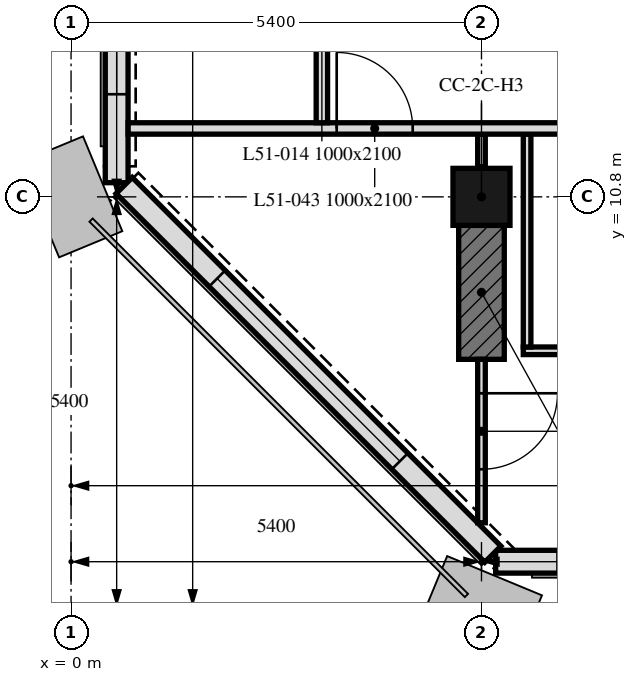
"""IFC4 building model, lengths in metres.
Left out: names, types, materials, properties, quantities, classifications, styles, units other than length and angle.
Written with IfcOpenShell. Run it as: python <this file> out.ifc"""

import sys

from ifc_helpers import new_model, si_unit, direction, frame, frame_2d, origin, origin_2d, place, context, subcontext, project, spatial, rectangle, extrude, element, fill, save


model = new_model("IFC4")
c1 = context("Model", 3, precision=1e-05, world=origin(), true_north=direction((0.0, 1.0)))
c2 = subcontext(c1, "Body", "Model", "MODEL_VIEW")
j1 = project(units=[si_unit("LENGTHUNIT", "METRE"), si_unit("PLANEANGLEUNIT", "RADIAN")], contexts=[c1])
p1 = place(None, origin())
s1 = spatial("IfcSite", under=j1, at=p1, CompositionType="ELEMENT")
p2 = place(p1, origin())
s2 = spatial("IfcBuilding", under=s1, at=p2, CompositionType="ELEMENT")
p3 = place(p2, frame((0.0, 0.0, 207.1)))
s3 = spatial("IfcBuildingStorey", under=s2, at=p3, CompositionType="ELEMENT", Elevation=207.1)
p4 = place(p3, frame((5.4, 10.8, 0.0), z_axis=(0.0, 0.0, 1.0), x_axis=(1.0, 0.0, 0.0)))
e1 = element("IfcColumn", 1, at=p4, inside=s3, PredefinedType="COLUMN", context=c2, shape_type="SweptSolid", body=[
    extrude(rectangle(XDim=0.75, YDim=0.75, at=origin_2d()), origin(), (0.0, 0.0, 1.0), 3.0),
])
p5 = place(p3, frame((5.4, 8.663, 0.0), z_axis=(0.0, 0.0, 1.0), x_axis=(0.0, 1.0, 0.0)))
e2 = element("IfcWall", 2, at=p5, inside=s3, PredefinedType="SHEAR", context=c2, shape_type="SweptSolid", body=[
    extrude(rectangle(XDim=1.762, YDim=0.6, at=frame_2d((0.881, 0.0))), origin(), (0.0, 0.0, 1.0), 3.0),
])
p6 = place(p3, frame((5.586, 6.0, 0.0), z_axis=(0.0, 0.0, 1.0), x_axis=(1.0, 0.0, 0.0)))
e3 = element("IfcWall", 3, at=p6, inside=s3, PredefinedType="SOLIDWALL", context=c2, shape_type="SweptSolid", body=[
    extrude(rectangle(XDim=32.027, YDim=0.3, at=frame_2d((16.014, 0.0))), origin(), (0.0, 0.0, 1.0), 3.0),
])
p7 = place(p6, frame((0.814, 0.0, 0.9)))
e4 = element("IfcOpeningElement", 4, at=p7, cuts=e3, PredefinedType="OPENING", context=c2, shape_type="SweptSolid", body=[
    extrude(rectangle(XDim=3.4, YDim=1.7, at=frame_2d((1.7, 0.85))), frame((0.0, 0.16, 0.0), z_axis=(0.0, -1.0, 0.0), x_axis=(1.0, 0.0, 0.0)), (0.0, 0.0, 1.0), 0.32),
])
p8 = place(p6, frame((6.564, 0.0, 0.9)))
e5 = element("IfcOpeningElement", 5, at=p8, cuts=e3, PredefinedType="OPENING", context=c2, shape_type="SweptSolid", body=[
    extrude(rectangle(XDim=1.1, YDim=1.7, at=frame_2d((0.55, 0.85))), frame((0.0, 0.16, 0.0), z_axis=(0.0, -1.0, 0.0), x_axis=(1.0, 0.0, 0.0)), (0.0, 0.0, 1.0), 0.32),
])
p9 = place(p6, frame((11.614, 0.0, 0.9)))
e6 = element("IfcOpeningElement", 6, at=p9, cuts=e3, PredefinedType="OPENING", context=c2, shape_type="SweptSolid", body=[
    extrude(rectangle(XDim=3.4, YDim=1.7, at=frame_2d((1.7, 0.85))), frame((0.0, 0.16, 0.0), z_axis=(0.0, -1.0, 0.0), x_axis=(1.0, 0.0, 0.0)), (0.0, 0.0, 1.0), 0.32),
])
p10 = place(p6, frame((17.364, 0.0, 0.9)))
e7 = element("IfcOpeningElement", 7, at=p10, cuts=e3, PredefinedType="OPENING", context=c2, shape_type="SweptSolid", body=[
    extrude(rectangle(XDim=1.1, YDim=1.7, at=frame_2d((0.55, 0.85))), frame((0.0, 0.16, 0.0), z_axis=(0.0, -1.0, 0.0), x_axis=(1.0, 0.0, 0.0)), (0.0, 0.0, 1.0), 0.32),
])
p11 = place(p6, frame((22.414, 0.0, 0.9)))
e8 = element("IfcOpeningElement", 8, at=p11, cuts=e3, PredefinedType="OPENING", context=c2, shape_type="SweptSolid", body=[
    extrude(rectangle(XDim=3.4, YDim=1.7, at=frame_2d((1.7, 0.85))), frame((0.0, 0.16, 0.0), z_axis=(0.0, -1.0, 0.0), x_axis=(1.0, 0.0, 0.0)), (0.0, 0.0, 1.0), 0.32),
])
p12 = place(p6, frame((28.164, 0.0, 0.9)))
e9 = element("IfcOpeningElement", 9, at=p12, cuts=e3, PredefinedType="OPENING", context=c2, shape_type="SweptSolid", body=[
    extrude(rectangle(XDim=1.1, YDim=1.7, at=frame_2d((0.55, 0.85))), frame((0.0, 0.16, 0.0), z_axis=(0.0, -1.0, 0.0), x_axis=(1.0, 0.0, 0.0)), (0.0, 0.0, 1.0), 0.32),
])
p13 = place(p3, frame((0.6, 43.014, 0.0), z_axis=(0.0, 0.0, 1.0), x_axis=(0.0, -1.0, 0.0)))
e10 = element("IfcWall", 10, at=p13, inside=s3, PredefinedType="SOLIDWALL", context=c2, shape_type="SweptSolid", body=[
    extrude(rectangle(XDim=32.027, YDim=0.3, at=frame_2d((16.014, 0.0))), origin(), (0.0, 0.0, 1.0), 3.0),
])
p14 = place(p13, frame((1.164, 0.0, 0.9)))
e11 = element("IfcOpeningElement", 11, at=p14, cuts=e10, PredefinedType="OPENING", context=c2, shape_type="SweptSolid", body=[
    extrude(rectangle(XDim=1.1, YDim=1.7, at=frame_2d((0.55, 0.85))), frame((0.0, 0.16, 0.0), z_axis=(0.0, -1.0, 0.0), x_axis=(1.0, 0.0, 0.0)), (0.0, 0.0, 1.0), 0.32),
])
p15 = place(p13, frame((3.139, 0.0, 0.9)))
e12 = element("IfcOpeningElement", 12, at=p15, cuts=e10, PredefinedType="OPENING", context=c2, shape_type="SweptSolid", body=[
    extrude(rectangle(XDim=0.65, YDim=1.7, at=frame_2d((0.325, 0.85))), frame((0.0, 0.16, 0.0), z_axis=(0.0, -1.0, 0.0), x_axis=(1.0, 0.0, 0.0)), (0.0, 0.0, 1.0), 0.32),
])
p16 = place(p13, frame((7.664, 0.0, 0.9)))
e13 = element("IfcOpeningElement", 13, at=p16, cuts=e10, PredefinedType="OPENING", context=c2, shape_type="SweptSolid", body=[
    extrude(rectangle(XDim=0.5, YDim=1.7, at=frame_2d((0.25, 0.85))), frame((0.0, 0.16, 0.0), z_axis=(0.0, -1.0, 0.0), x_axis=(1.0, 0.0, 0.0)), (0.0, 0.0, 1.0), 0.32),
])
p17 = place(p13, frame((13.064, 0.0, 0.9)))
e14 = element("IfcOpeningElement", 14, at=p17, cuts=e10, PredefinedType="OPENING", context=c2, shape_type="SweptSolid", body=[
    extrude(rectangle(XDim=0.5, YDim=1.7, at=frame_2d((0.25, 0.85))), frame((0.0, 0.16, 0.0), z_axis=(0.0, -1.0, 0.0), x_axis=(1.0, 0.0, 0.0)), (0.0, 0.0, 1.0), 0.32),
])
p18 = place(p13, frame((18.464, 0.0, 0.9)))
e15 = element("IfcOpeningElement", 15, at=p18, cuts=e10, PredefinedType="OPENING", context=c2, shape_type="SweptSolid", body=[
    extrude(rectangle(XDim=0.5, YDim=1.7, at=frame_2d((0.25, 0.85))), frame((0.0, 0.16, 0.0), z_axis=(0.0, -1.0, 0.0), x_axis=(1.0, 0.0, 0.0)), (0.0, 0.0, 1.0), 0.32),
])
p19 = place(p13, frame((23.864, 0.0, 0.9)))
e16 = element("IfcOpeningElement", 16, at=p19, cuts=e10, PredefinedType="OPENING", context=c2, shape_type="SweptSolid", body=[
    extrude(rectangle(XDim=0.5, YDim=1.7, at=frame_2d((0.25, 0.85))), frame((0.0, 0.16, 0.0), z_axis=(0.0, -1.0, 0.0), x_axis=(1.0, 0.0, 0.0)), (0.0, 0.0, 1.0), 0.32),
])
p20 = place(p13, frame((28.164, 0.0, 0.9)))
e17 = element("IfcOpeningElement", 17, at=p20, cuts=e10, PredefinedType="OPENING", context=c2, shape_type="SweptSolid", body=[
    extrude(rectangle(XDim=1.1, YDim=1.7, at=frame_2d((0.55, 0.85))), frame((0.0, 0.16, 0.0), z_axis=(0.0, -1.0, 0.0), x_axis=(1.0, 0.0, 0.0)), (0.0, 0.0, 1.0), 0.32),
])
p21 = place(p13, frame((29.764, 0.0, 0.9)))
e18 = element("IfcOpeningElement", 18, at=p21, cuts=e10, PredefinedType="OPENING", context=c2, shape_type="SweptSolid", body=[
    extrude(rectangle(XDim=1.1, YDim=1.7, at=frame_2d((0.55, 0.85))), frame((0.0, 0.16, 0.0), z_axis=(0.0, -1.0, 0.0), x_axis=(1.0, 0.0, 0.0)), (0.0, 0.0, 1.0), 0.32),
])
p22 = place(p3, frame((0.699, 10.949, 0.0), z_axis=(0.0, 0.0, 1.0), x_axis=(0.707106781187, -0.707106781187, 0.0)))
e19 = element("IfcWall", 19, at=p22, inside=s3, PredefinedType="SOLIDWALL", context=c2, shape_type="SweptSolid", body=[
    extrude(rectangle(XDim=6.86, YDim=0.3, at=frame_2d((3.43, 0.0))), origin(), (0.0, 0.0, 1.0), 3.0),
])
p23 = place(p22, frame((1.73, 0.0, 0.9)))
e20 = element("IfcOpeningElement", 20, at=p23, cuts=e19, PredefinedType="OPENING", context=c2, shape_type="SweptSolid", body=[
    extrude(rectangle(XDim=3.4, YDim=1.7, at=frame_2d((1.7, 0.85))), frame((0.0, 0.16, 0.0), z_axis=(0.0, -1.0, 0.0), x_axis=(1.0, 0.0, 0.0)), (0.0, 0.0, 1.0), 0.32),
])
p24 = place(p3, frame((8.35, 8.775, 0.0), z_axis=(0.0, 0.0, 1.0), x_axis=(-1.0, 0.0, 0.0)))
e21 = element("IfcWall", 21, at=p24, inside=s3, PredefinedType="PARTITIONING", context=c2, shape_type="SweptSolid", body=[
    extrude(rectangle(XDim=2.4, YDim=0.1, at=frame_2d((1.2, 0.0))), origin(), (0.0, 0.0, 1.0), 3.0),
])
p25 = place(p3, frame((6.0, 8.825, 0.0), z_axis=(0.0, 0.0, 1.0), x_axis=(0.0, 1.0, 0.0)))
e22 = element("IfcWall", 22, at=p25, inside=s3, PredefinedType="PARTITIONING", context=c2, shape_type="SweptSolid", body=[
    extrude(rectangle(XDim=2.8, YDim=0.1, at=frame_2d((1.4, 0.0))), origin(), (0.0, 0.0, 1.0), 3.0),
])
p26 = place(p3, frame((5.4, 11.625, 0.0), z_axis=(0.0, 0.0, 1.0), x_axis=(0.0, -1.0, 0.0)))
e23 = element("IfcWall", 23, at=p26, inside=s3, PredefinedType="PARTITIONING", context=c2, shape_type="SweptSolid", body=[
    extrude(rectangle(XDim=0.43, YDim=0.1, at=frame_2d((0.215, 0.0))), origin(), (0.0, 0.0, 1.0), 3.0),
])
p27 = place(p3, frame((5.4, 8.663, 0.0), z_axis=(0.0, 0.0, 1.0), x_axis=(0.0, -1.0, 0.0)))
e24 = element("IfcWall", 24, at=p27, inside=s3, PredefinedType="PARTITIONING", context=c2, shape_type="SweptSolid", body=[
    extrude(rectangle(XDim=2.15, YDim=0.1, at=frame_2d((1.075, 0.0))), origin(), (0.0, 0.0, 1.0), 3.0),
])
p28 = place(p27, frame((0.447, 0.0, 0.0)))
e25 = element("IfcOpeningElement", 25, at=p28, cuts=e24, PredefinedType="OPENING", context=c2, shape_type="SweptSolid", body=[
    extrude(rectangle(XDim=1.0, YDim=2.1, at=frame_2d((0.5, 1.05))), frame((0.0, 0.05, 0.0), z_axis=(0.0, -1.0, 0.0), x_axis=(1.0, 0.0, 0.0)), (0.0, 0.0, 1.0), 0.1),
])
p29 = place(p3, frame((0.751, 11.7, 0.0), z_axis=(0.0, 0.0, 1.0), x_axis=(1.0, 0.0, 0.0)))
e26 = element("IfcWall", 26, at=p29, inside=s3, PredefinedType="PARTITIONING", context=c2, shape_type="SweptSolid", body=[
    extrude(rectangle(XDim=41.698, YDim=0.15, at=frame_2d((20.849, 0.0))), origin(), (0.0, 0.0, 1.0), 3.0),
])
p30 = place(p29, frame((27.649, 0.0, 0.0)))
e27 = element("IfcOpeningElement", 27, at=p30, cuts=e26, PredefinedType="OPENING", context=c2, shape_type="SweptSolid", body=[
    extrude(rectangle(XDim=1.0, YDim=2.1, at=frame_2d((0.5, 1.05))), frame((0.0, 0.075, 0.0), z_axis=(0.0, -1.0, 0.0), x_axis=(1.0, 0.0, 0.0)), (0.0, 0.0, 1.0), 0.15),
])
p31 = place(p29, frame((22.249, 0.0, 0.0)))
e28 = element("IfcOpeningElement", 28, at=p31, cuts=e26, PredefinedType="OPENING", context=c2, shape_type="SweptSolid", body=[
    extrude(rectangle(XDim=1.0, YDim=2.1, at=frame_2d((0.5, 1.05))), frame((0.0, 0.075, 0.0), z_axis=(0.0, -1.0, 0.0), x_axis=(1.0, 0.0, 0.0)), (0.0, 0.0, 1.0), 0.15),
])
p32 = place(p29, frame((16.849, 0.0, 0.0)))
e29 = element("IfcOpeningElement", 29, at=p32, cuts=e26, PredefinedType="OPENING", context=c2, shape_type="SweptSolid", body=[
    extrude(rectangle(XDim=1.0, YDim=2.1, at=frame_2d((0.5, 1.05))), frame((0.0, 0.075, 0.0), z_axis=(0.0, -1.0, 0.0), x_axis=(1.0, 0.0, 0.0)), (0.0, 0.0, 1.0), 0.15),
])
p33 = place(p29, frame((11.449, 0.0, 0.0)))
e30 = element("IfcOpeningElement", 30, at=p33, cuts=e26, PredefinedType="OPENING", context=c2, shape_type="SweptSolid", body=[
    extrude(rectangle(XDim=1.0, YDim=2.1, at=frame_2d((0.5, 1.05))), frame((0.0, 0.075, 0.0), z_axis=(0.0, -1.0, 0.0), x_axis=(1.0, 0.0, 0.0)), (0.0, 0.0, 1.0), 0.15),
])
p34 = place(p29, frame((2.744, 0.0, 0.0)))
e31 = element("IfcOpeningElement", 31, at=p34, cuts=e26, PredefinedType="OPENING", context=c2, shape_type="SweptSolid", body=[
    extrude(rectangle(XDim=1.0, YDim=2.1, at=frame_2d((0.5, 1.05))), frame((0.0, 0.075, 0.0), z_axis=(0.0, -1.0, 0.0), x_axis=(1.0, 0.0, 0.0)), (0.0, 0.0, 1.0), 0.15),
])
p35 = place(p29, frame((39.249, 0.0, 0.0)))
e32 = element("IfcOpeningElement", 32, at=p35, cuts=e26, PredefinedType="OPENING", context=c2, shape_type="SweptSolid", body=[
    extrude(rectangle(XDim=1.0, YDim=2.1, at=frame_2d((0.5, 1.05))), frame((0.0, 0.075, 0.0), z_axis=(0.0, -1.0, 0.0), x_axis=(1.0, 0.0, 0.0)), (0.0, 0.0, 1.0), 0.15),
])
p36 = place(p3, frame((3.3, 11.775, 0.0), z_axis=(0.0, 0.0, 1.0), x_axis=(0.0, 1.0, 0.0)))
e33 = element("IfcWall", 33, at=p36, inside=s3, PredefinedType="PARTITIONING", context=c2, shape_type="SweptSolid", body=[
    extrude(rectangle(XDim=15.15, YDim=0.15, at=frame_2d((7.575, 0.0))), origin(), (0.0, 0.0, 1.0), 2.4),
])
p37 = place(p36, frame((1.675, 0.0, 0.0)))
e34 = element("IfcOpeningElement", 34, at=p37, cuts=e33, PredefinedType="OPENING", context=c2, shape_type="SweptSolid", body=[
    extrude(rectangle(XDim=1.0, YDim=2.1, at=frame_2d((0.5, 1.05))), frame((0.0, 0.075, 0.0), z_axis=(0.0, -1.0, 0.0), x_axis=(1.0, 0.0, 0.0)), (0.0, 0.0, 1.0), 0.15),
])
p38 = place(p36, frame((7.975, 0.0, 0.0)))
e35 = element("IfcOpeningElement", 35, at=p38, cuts=e33, PredefinedType="OPENING", context=c2, shape_type="SweptSolid", body=[
    extrude(rectangle(XDim=1.0, YDim=2.1, at=frame_2d((0.5, 1.05))), frame((0.0, 0.075, 0.0), z_axis=(0.0, -1.0, 0.0), x_axis=(1.0, 0.0, 0.0)), (0.0, 0.0, 1.0), 0.15),
])
p39 = place(p21, origin())
e36 = element("IfcWindow", 36, at=p39, inside=s3, PartitioningType="SINGLE_PANEL", PredefinedType="WINDOW", context=c2, shape_type="SweptSolid", body=[
    extrude(rectangle(XDim=1.1, YDim=1.7, at=frame_2d((0.55, 0.85))), frame((0.0, 0.03, 0.0), z_axis=(0.0, -1.0, 0.0), x_axis=(1.0, 0.0, 0.0)), (0.0, 0.0, 1.0), 0.06),
])
fill(e18, e36)
p40 = place(p23, origin())
e37 = element("IfcWindow", 37, at=p40, inside=s3, PartitioningType="SINGLE_PANEL", PredefinedType="WINDOW", context=c2, shape_type="SweptSolid", body=[
    extrude(rectangle(XDim=3.4, YDim=1.7, at=frame_2d((1.7, 0.85))), frame((0.0, 0.03, 0.0), z_axis=(0.0, -1.0, 0.0), x_axis=(1.0, 0.0, 0.0)), (0.0, 0.0, 1.0), 0.06),
])
fill(e20, e37)
p41 = place(p28, origin())
e38 = element("IfcDoor", 38, at=p41, inside=s3, OperationType="SINGLE_SWING_RIGHT", PredefinedType="DOOR", context=c2, shape_type="SweptSolid", body=[
    extrude(rectangle(XDim=1.0, YDim=2.1, at=frame_2d((0.5, 1.05))), frame((0.0, 0.025, 0.0), z_axis=(0.0, -1.0, 0.0), x_axis=(1.0, 0.0, 0.0)), (0.0, 0.0, 1.0), 0.05),
])
fill(e25, e38)
p42 = place(p34, origin())
e39 = element("IfcDoor", 39, at=p42, inside=s3, OperationType="SINGLE_SWING_RIGHT", PredefinedType="DOOR", context=c2, shape_type="SweptSolid", body=[
    extrude(rectangle(XDim=1.0, YDim=2.1, at=frame_2d((0.5, 1.05))), frame((0.0, 0.025, 0.0), z_axis=(0.0, -1.0, 0.0), x_axis=(1.0, 0.0, 0.0)), (0.0, 0.0, 1.0), 0.05),
])
fill(e31, e39)
save(model, sys.argv[1])
